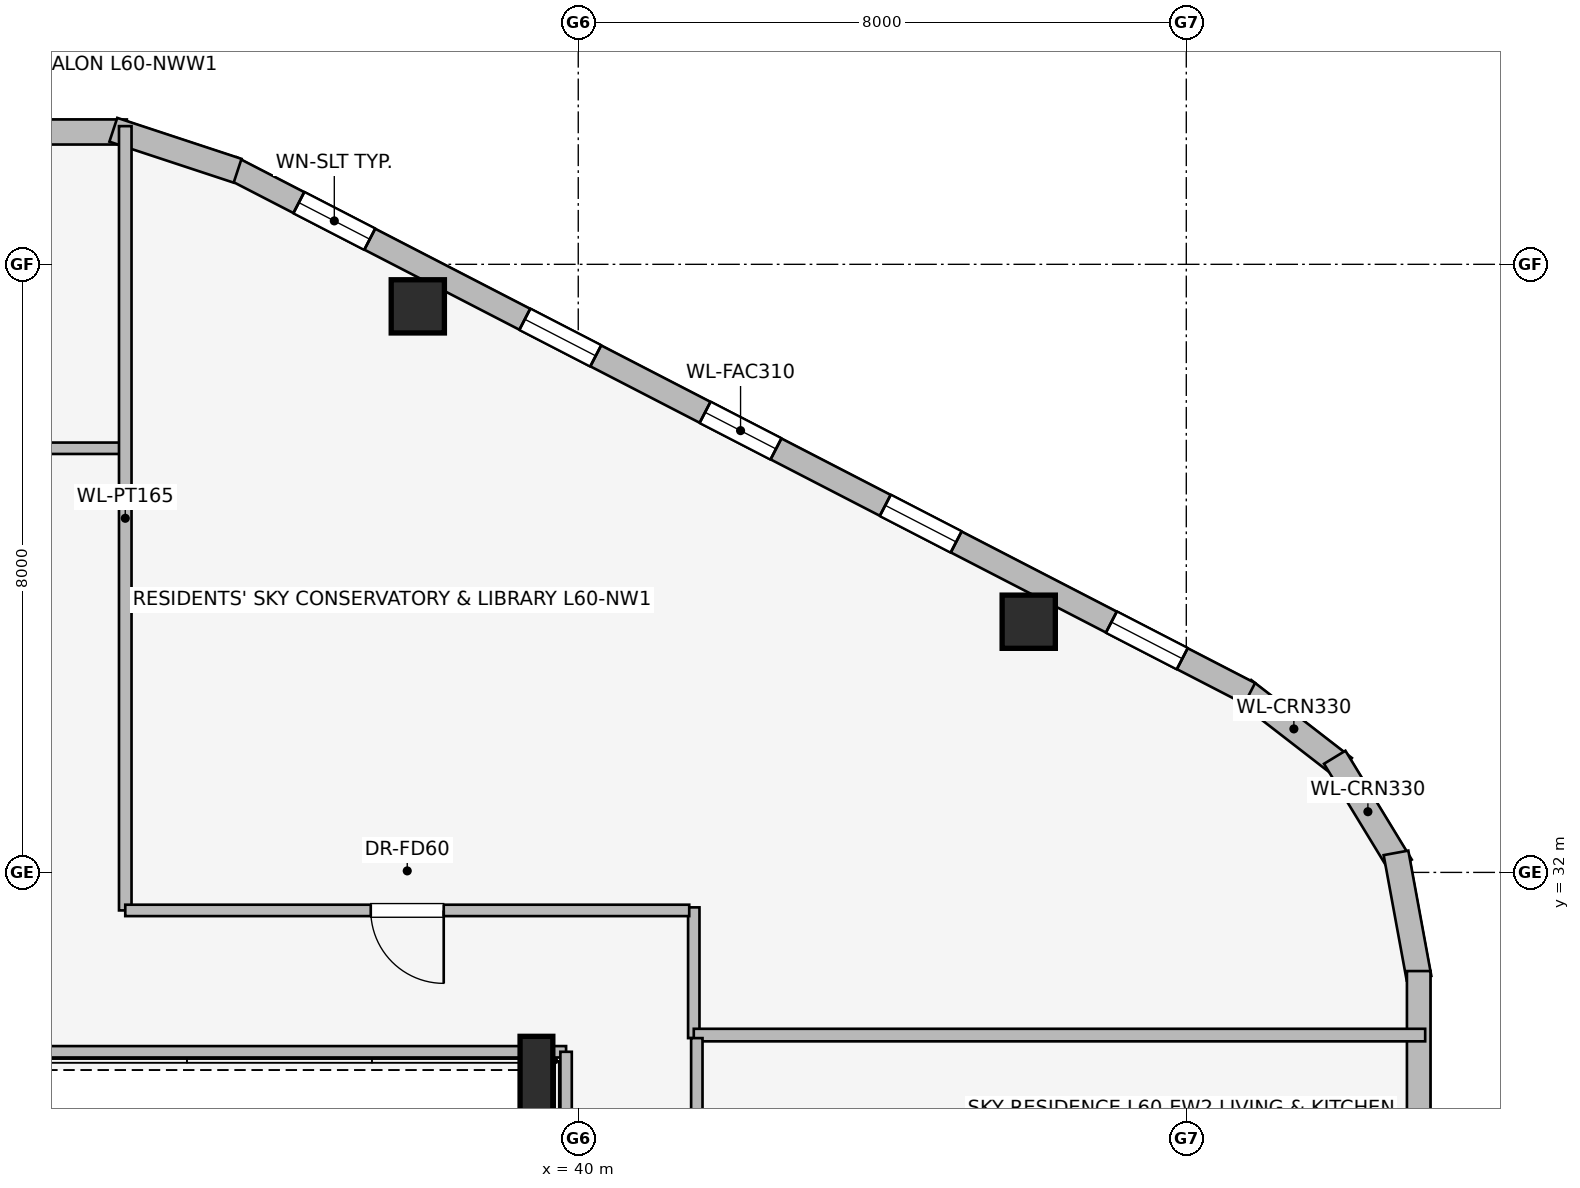
"""IFC4 building model, lengths in metres.
Left out: names, types, materials, properties, quantities, classifications, styles, units other than length and angle.
Written with IfcOpenShell. Run it as: python <this file> out.ifc"""

import sys

from ifc_helpers import new_model, si_unit, direction, frame, frame_2d, origin, origin_2d, place, context, subcontext, project, spatial, rectangle, i_section, extrude, element, fill, save


model = new_model("IFC4")
c1 = context("Model", 3, precision=1e-05, world=origin(), true_north=direction((0.0, 1.0)))
c2 = subcontext(c1, "Body", "Model", "MODEL_VIEW")
j1 = project(units=[si_unit("LENGTHUNIT", "METRE"), si_unit("PLANEANGLEUNIT", "RADIAN")], contexts=[c1])
p1 = place(None, origin())
s1 = spatial("IfcSite", under=j1, at=p1, CompositionType="ELEMENT")
p2 = place(p1, origin())
s2 = spatial("IfcBuilding", under=s1, at=p2, CompositionType="ELEMENT")
p3 = place(p2, frame((0.0, 0.0, 220.6)))
s3 = spatial("IfcBuildingStorey", under=s2, at=p3, CompositionType="ELEMENT", Elevation=220.6)
for number, where, z_axis, x_axis in (
    (1, (45.927, 35.298, 0.0), (0.0, 0.0, 1.0), (1.0, 0.0, 0.0)),
    (2, (37.889, 39.447, 0.0), (0.0, 0.0, 1.0), (1.0, 0.0, 0.0)),
):
    element("IfcColumn", number, at=place(p3, frame(where, z_axis=z_axis, x_axis=x_axis)), inside=s3, PredefinedType="COLUMN", context=c2, shape_type="SweptSolid", body=[
        extrude(rectangle(XDim=0.7, YDim=0.7, at=origin_2d()), origin(), (0.0, 0.0, 1.0), 3.55),
    ])
p4 = place(p3, frame((39.45, 29.35, 0.0), z_axis=(0.0, 0.0, 1.0), x_axis=(1.0, 0.0, 0.0)))
e3 = element("IfcColumn", 3, at=p4, inside=s3, PredefinedType="COLUMN", context=c2, shape_type="SweptSolid", body=[
    extrude(i_section(OverallWidth=0.431, OverallDepth=0.987, WebThickness=0.034, FlangeThickness=0.062, at=origin_2d()), origin(), (0.0, 0.0, 1.0), 3.55),
])
p5 = place(p3, frame((48.753, 34.401, 0.0), z_axis=(0.0, 0.0, 1.0), x_axis=(0.790691856293, -0.61221433207, 0.0)))
e4 = element("IfcWall", 4, at=p5, inside=s3, PredefinedType="STANDARD", context=c2, shape_type="SweptSolid", body=[
    extrude(rectangle(XDim=1.676, YDim=0.33, at=frame_2d((0.838, 0.0))), origin(), (0.0, 0.0, 1.0), 3.29),
])
p6 = place(p3, frame((49.953, 33.515, 0.0), z_axis=(0.0, 0.0, 1.0), x_axis=(0.520325409202, -0.853968072318, 0.0)))
e5 = element("IfcWall", 5, at=p6, inside=s3, PredefinedType="STANDARD", context=c2, shape_type="SweptSolid", body=[
    extrude(rectangle(XDim=1.678, YDim=0.33, at=frame_2d((0.839, 0.0))), origin(), (0.0, 0.0, 1.0), 3.29),
])
p7 = place(p3, frame((50.759, 32.257, 0.0), z_axis=(0.0, 0.0, 1.0), x_axis=(0.180691763044, -0.983539773862, 0.0)))
e6 = element("IfcWall", 6, at=p7, inside=s3, PredefinedType="STANDARD", context=c2, shape_type="SweptSolid", body=[
    extrude(rectangle(XDim=1.677, YDim=0.33, at=frame_2d((0.838, 0.0))), origin(), (0.0, 0.0, 1.0), 3.29),
])
p8 = place(p3, frame((35.437, 41.27, 0.0), z_axis=(0.0, 0.0, 1.0), x_axis=(0.888581481622, -0.458718814218, 0.0)))
e7 = element("IfcWall", 7, at=p8, inside=s3, PredefinedType="STANDARD", context=c2, shape_type="SweptSolid", body=[
    extrude(rectangle(XDim=15.077, YDim=0.31, at=frame_2d((7.539, 0.0))), origin(), (0.0, 0.0, 1.0), 3.29),
])
p9 = place(p8, frame((0.998, 0.0, 0.75)))
e8 = element("IfcOpeningElement", 8, at=p9, cuts=e7, PredefinedType="OPENING", context=c2, shape_type="SweptSolid", body=[
    extrude(rectangle(XDim=1.05, YDim=1.4, at=frame_2d((0.525, 0.7))), frame((0.0, 0.165, 0.0), z_axis=(0.0, -1.0, 0.0), x_axis=(1.0, 0.0, 0.0)), (0.0, 0.0, 1.0), 0.33),
])
p10 = place(p8, frame((4.344, 0.0, 0.75)))
e9 = element("IfcOpeningElement", 9, at=p10, cuts=e7, PredefinedType="OPENING", context=c2, shape_type="SweptSolid", body=[
    extrude(rectangle(XDim=1.05, YDim=1.4, at=frame_2d((0.525, 0.7))), frame((0.0, 0.165, 0.0), z_axis=(0.0, -1.0, 0.0), x_axis=(1.0, 0.0, 0.0)), (0.0, 0.0, 1.0), 0.33),
])
p11 = place(p8, frame((7.013, 0.0, 0.75)))
e10 = element("IfcOpeningElement", 10, at=p11, cuts=e7, PredefinedType="OPENING", context=c2, shape_type="SweptSolid", body=[
    extrude(rectangle(XDim=1.05, YDim=1.4, at=frame_2d((0.525, 0.7))), frame((0.0, 0.165, 0.0), z_axis=(0.0, -1.0, 0.0), x_axis=(1.0, 0.0, 0.0)), (0.0, 0.0, 1.0), 0.33),
])
p12 = place(p8, frame((9.681, 0.0, 0.75)))
e11 = element("IfcOpeningElement", 11, at=p12, cuts=e7, PredefinedType="OPENING", context=c2, shape_type="SweptSolid", body=[
    extrude(rectangle(XDim=1.05, YDim=1.4, at=frame_2d((0.525, 0.7))), frame((0.0, 0.165, 0.0), z_axis=(0.0, -1.0, 0.0), x_axis=(1.0, 0.0, 0.0)), (0.0, 0.0, 1.0), 0.33),
])
p13 = place(p8, frame((13.029, 0.0, 0.75)))
e12 = element("IfcOpeningElement", 12, at=p13, cuts=e7, PredefinedType="OPENING", context=c2, shape_type="SweptSolid", body=[
    extrude(rectangle(XDim=1.05, YDim=1.4, at=frame_2d((0.525, 0.7))), frame((0.0, 0.165, 0.0), z_axis=(0.0, -1.0, 0.0), x_axis=(1.0, 0.0, 0.0)), (0.0, 0.0, 1.0), 0.33),
])
p14 = place(p3, frame((32.339, 41.741, 0.0), z_axis=(0.0, 0.0, 1.0), x_axis=(1.0, 0.0, 0.0)))
e13 = element("IfcWall", 13, at=p14, inside=s3, PredefinedType="STANDARD", context=c2, shape_type="SweptSolid", body=[
    extrude(rectangle(XDim=1.722, YDim=0.33, at=frame_2d((0.861, 0.0))), origin(), (0.0, 0.0, 1.0), 3.29),
])
p15 = place(p3, frame((33.883, 41.77, 0.0), z_axis=(0.0, 0.0, 1.0), x_axis=(0.949713440491, -0.313120393699, 0.0)))
e14 = element("IfcWall", 14, at=p15, inside=s3, PredefinedType="STANDARD", context=c2, shape_type="SweptSolid", body=[
    extrude(rectangle(XDim=1.722, YDim=0.33, at=frame_2d((0.861, 0.0))), origin(), (0.0, 0.0, 1.0), 3.29),
])
p16 = place(p3, frame((51.058, 30.702, 0.0), z_axis=(0.0, 0.0, 1.0), x_axis=(0.0, -1.0, 0.0)))
e15 = element("IfcWall", 15, at=p16, inside=s3, PredefinedType="STANDARD", context=c2, shape_type="SweptSolid", body=[
    extrude(rectangle(XDim=13.404, YDim=0.31, at=frame_2d((6.702, 0.0))), origin(), (0.0, 0.0, 1.0), 3.29),
])
p17 = place(p16, frame((4.706, 0.0, 0.75)))
e16 = element("IfcOpeningElement", 16, at=p17, cuts=e15, PredefinedType="OPENING", context=c2, shape_type="SweptSolid", body=[
    extrude(rectangle(XDim=2.4, YDim=1.6, at=frame_2d((1.2, 0.8))), frame((0.0, 0.165, 0.0), z_axis=(0.0, -1.0, 0.0), x_axis=(1.0, 0.0, 0.0)), (0.0, 0.0, 1.0), 0.33),
])
p18 = place(p16, frame((8.807, 0.0, 0.75)))
e17 = element("IfcOpeningElement", 17, at=p18, cuts=e15, PredefinedType="OPENING", context=c2, shape_type="SweptSolid", body=[
    extrude(rectangle(XDim=1.05, YDim=1.4, at=frame_2d((0.525, 0.7))), frame((0.0, 0.165, 0.0), z_axis=(0.0, -1.0, 0.0), x_axis=(1.0, 0.0, 0.0)), (0.0, 0.0, 1.0), 0.33),
])
p19 = place(p3, frame((39.84, 29.64, 0.0), z_axis=(0.0, 0.0, 1.0), x_axis=(-1.0, 0.0, 0.0)))
e18 = element("IfcWall", 18, at=p19, inside=s3, PredefinedType="PARTITIONING", context=c2, shape_type="SweptSolid", body=[
    extrude(rectangle(XDim=12.203, YDim=0.15, at=frame_2d((6.102, 0.0))), origin(), (0.0, 0.0, 1.0), 2.431),
])
p20 = place(p3, frame((39.84, 18.36, 0.0), z_axis=(0.0, 0.0, 1.0), x_axis=(0.0, 1.0, 0.0)))
e19 = element("IfcWall", 19, at=p20, inside=s3, PredefinedType="PARTITIONING", context=c2, shape_type="SweptSolid", body=[
    extrude(rectangle(XDim=11.28, YDim=0.15, at=frame_2d((5.64, 0.0))), origin(), (0.0, 0.0, 1.0), 3.29),
])
p21 = place(p3, frame((34.0, 37.58, 0.0), z_axis=(0.0, 0.0, 1.0), x_axis=(-1.0, 0.0, 0.0)))
e20 = element("IfcWall", 20, at=p21, inside=s3, PredefinedType="PARTITIONING", context=c2, shape_type="SweptSolid", body=[
    extrude(rectangle(XDim=10.501, YDim=0.15, at=frame_2d((5.25, 0.0))), origin(), (0.0, 0.0, 1.0), 3.29),
])
p22 = place(p21, frame((4.879, 0.0, 0.0)))
e21 = element("IfcOpeningElement", 21, at=p22, cuts=e20, PredefinedType="OPENING", context=c2, shape_type="SweptSolid", body=[
    extrude(rectangle(XDim=0.96, YDim=2.0, at=frame_2d((0.48, 1.0))), frame((0.0, 0.085, 0.0), z_axis=(0.0, -1.0, 0.0), x_axis=(1.0, 0.0, 0.0)), (0.0, 0.0, 1.0), 0.17),
])
p23 = place(p3, frame((34.04, 31.5, 0.0), z_axis=(0.0, 0.0, 1.0), x_axis=(0.0, 1.0, 0.0)))
e22 = element("IfcWall", 22, at=p23, inside=s3, PredefinedType="PARTITIONING", context=c2, shape_type="SweptSolid", body=[
    extrude(rectangle(XDim=10.318, YDim=0.165, at=frame_2d((5.159, 0.0))), origin(), (0.0, 0.0, 1.0), 3.29),
])
p24 = place(p3, frame((41.52, 29.82, 0.0), z_axis=(0.0, 0.0, 1.0), x_axis=(0.0, 1.0, 0.0)))
e23 = element("IfcWall", 23, at=p24, inside=s3, PredefinedType="PARTITIONING", context=c2, shape_type="SweptSolid", body=[
    extrude(rectangle(XDim=1.72, YDim=0.15, at=frame_2d((0.86, 0.0))), origin(), (0.0, 0.0, 1.0), 3.29),
])
p25 = place(p3, frame((41.46, 31.5, 0.0), z_axis=(0.0, 0.0, 1.0), x_axis=(-1.0, 0.0, 0.0)))
e24 = element("IfcWall", 24, at=p25, inside=s3, PredefinedType="PARTITIONING", context=c2, shape_type="SweptSolid", body=[
    extrude(rectangle(XDim=7.42, YDim=0.15, at=frame_2d((3.71, 0.0))), origin(), (0.0, 0.0, 1.0), 3.29),
])
p26 = place(p25, frame((3.23, 0.0, 0.0)))
e25 = element("IfcOpeningElement", 25, at=p26, cuts=e24, PredefinedType="OPENING", context=c2, shape_type="SweptSolid", body=[
    extrude(rectangle(XDim=0.96, YDim=2.0, at=frame_2d((0.48, 1.0))), frame((0.0, 0.085, 0.0), z_axis=(0.0, -1.0, 0.0), x_axis=(1.0, 0.0, 0.0)), (0.0, 0.0, 1.0), 0.17),
])
p27 = place(p3, frame((41.52, 29.86, 0.0), z_axis=(0.0, 0.0, 1.0), x_axis=(1.0, 0.0, 0.0)))
e26 = element("IfcWall", 26, at=p27, inside=s3, PredefinedType="PARTITIONING", context=c2, shape_type="SweptSolid", body=[
    extrude(rectangle(XDim=9.623, YDim=0.165, at=frame_2d((4.812, 0.0))), origin(), (0.0, 0.0, 1.0), 3.29),
])
p28 = place(p3, frame((41.56, 22.621, 0.0), z_axis=(0.0, 0.0, 1.0), x_axis=(0.0, 1.0, 0.0)))
e27 = element("IfcWall", 27, at=p28, inside=s3, PredefinedType="PARTITIONING", context=c2, shape_type="SweptSolid", body=[
    extrude(rectangle(XDim=7.199, YDim=0.15, at=frame_2d((3.6, 0.0))), origin(), (0.0, 0.0, 1.0), 3.29),
])
p29 = place(p28, frame((4.37, 0.0, 0.0)))
e28 = element("IfcOpeningElement", 28, at=p29, cuts=e27, PredefinedType="OPENING", context=c2, shape_type="SweptSolid", body=[
    extrude(rectangle(XDim=0.96, YDim=2.0, at=frame_2d((0.48, 1.0))), frame((0.0, 0.085, 0.0), z_axis=(0.0, -1.0, 0.0), x_axis=(1.0, 0.0, 0.0)), (0.0, 0.0, 1.0), 0.17),
])
p30 = place(p9, origin())
e29 = element("IfcWindow", 29, at=p30, inside=s3, PartitioningType="SINGLE_PANEL", PredefinedType="WINDOW", context=c2, shape_type="SweptSolid", body=[
    extrude(rectangle(XDim=1.05, YDim=1.4, at=frame_2d((0.525, 0.7))), frame((0.0, 0.03, 0.0), z_axis=(0.0, -1.0, 0.0), x_axis=(1.0, 0.0, 0.0)), (0.0, 0.0, 1.0), 0.06),
])
fill(e8, e29)
p31 = place(p10, origin())
e30 = element("IfcWindow", 30, at=p31, inside=s3, PartitioningType="SINGLE_PANEL", PredefinedType="WINDOW", context=c2, shape_type="SweptSolid", body=[
    extrude(rectangle(XDim=1.05, YDim=1.4, at=frame_2d((0.525, 0.7))), frame((0.0, 0.03, 0.0), z_axis=(0.0, -1.0, 0.0), x_axis=(1.0, 0.0, 0.0)), (0.0, 0.0, 1.0), 0.06),
])
fill(e9, e30)
p32 = place(p11, origin())
e31 = element("IfcWindow", 31, at=p32, inside=s3, PartitioningType="SINGLE_PANEL", PredefinedType="WINDOW", context=c2, shape_type="SweptSolid", body=[
    extrude(rectangle(XDim=1.05, YDim=1.4, at=frame_2d((0.525, 0.7))), frame((0.0, 0.03, 0.0), z_axis=(0.0, -1.0, 0.0), x_axis=(1.0, 0.0, 0.0)), (0.0, 0.0, 1.0), 0.06),
])
fill(e10, e31)
p33 = place(p12, origin())
e32 = element("IfcWindow", 32, at=p33, inside=s3, PartitioningType="SINGLE_PANEL", PredefinedType="WINDOW", context=c2, shape_type="SweptSolid", body=[
    extrude(rectangle(XDim=1.05, YDim=1.4, at=frame_2d((0.525, 0.7))), frame((0.0, 0.03, 0.0), z_axis=(0.0, -1.0, 0.0), x_axis=(1.0, 0.0, 0.0)), (0.0, 0.0, 1.0), 0.06),
])
fill(e11, e32)
p34 = place(p13, origin())
e33 = element("IfcWindow", 33, at=p34, inside=s3, PartitioningType="SINGLE_PANEL", PredefinedType="WINDOW", context=c2, shape_type="SweptSolid", body=[
    extrude(rectangle(XDim=1.05, YDim=1.4, at=frame_2d((0.525, 0.7))), frame((0.0, 0.03, 0.0), z_axis=(0.0, -1.0, 0.0), x_axis=(1.0, 0.0, 0.0)), (0.0, 0.0, 1.0), 0.06),
])
fill(e12, e33)
p35 = place(p26, origin())
e34 = element("IfcDoor", 34, at=p35, inside=s3, OperationType="SINGLE_SWING_LEFT", PredefinedType="DOOR", context=c2, shape_type="SweptSolid", body=[
    extrude(rectangle(XDim=0.96, YDim=2.0, at=frame_2d((0.48, 1.0))), frame((0.0, 0.025, 0.0), z_axis=(0.0, -1.0, 0.0), x_axis=(1.0, 0.0, 0.0)), (0.0, 0.0, 1.0), 0.05),
])
fill(e25, e34)
save(model, sys.argv[1])
